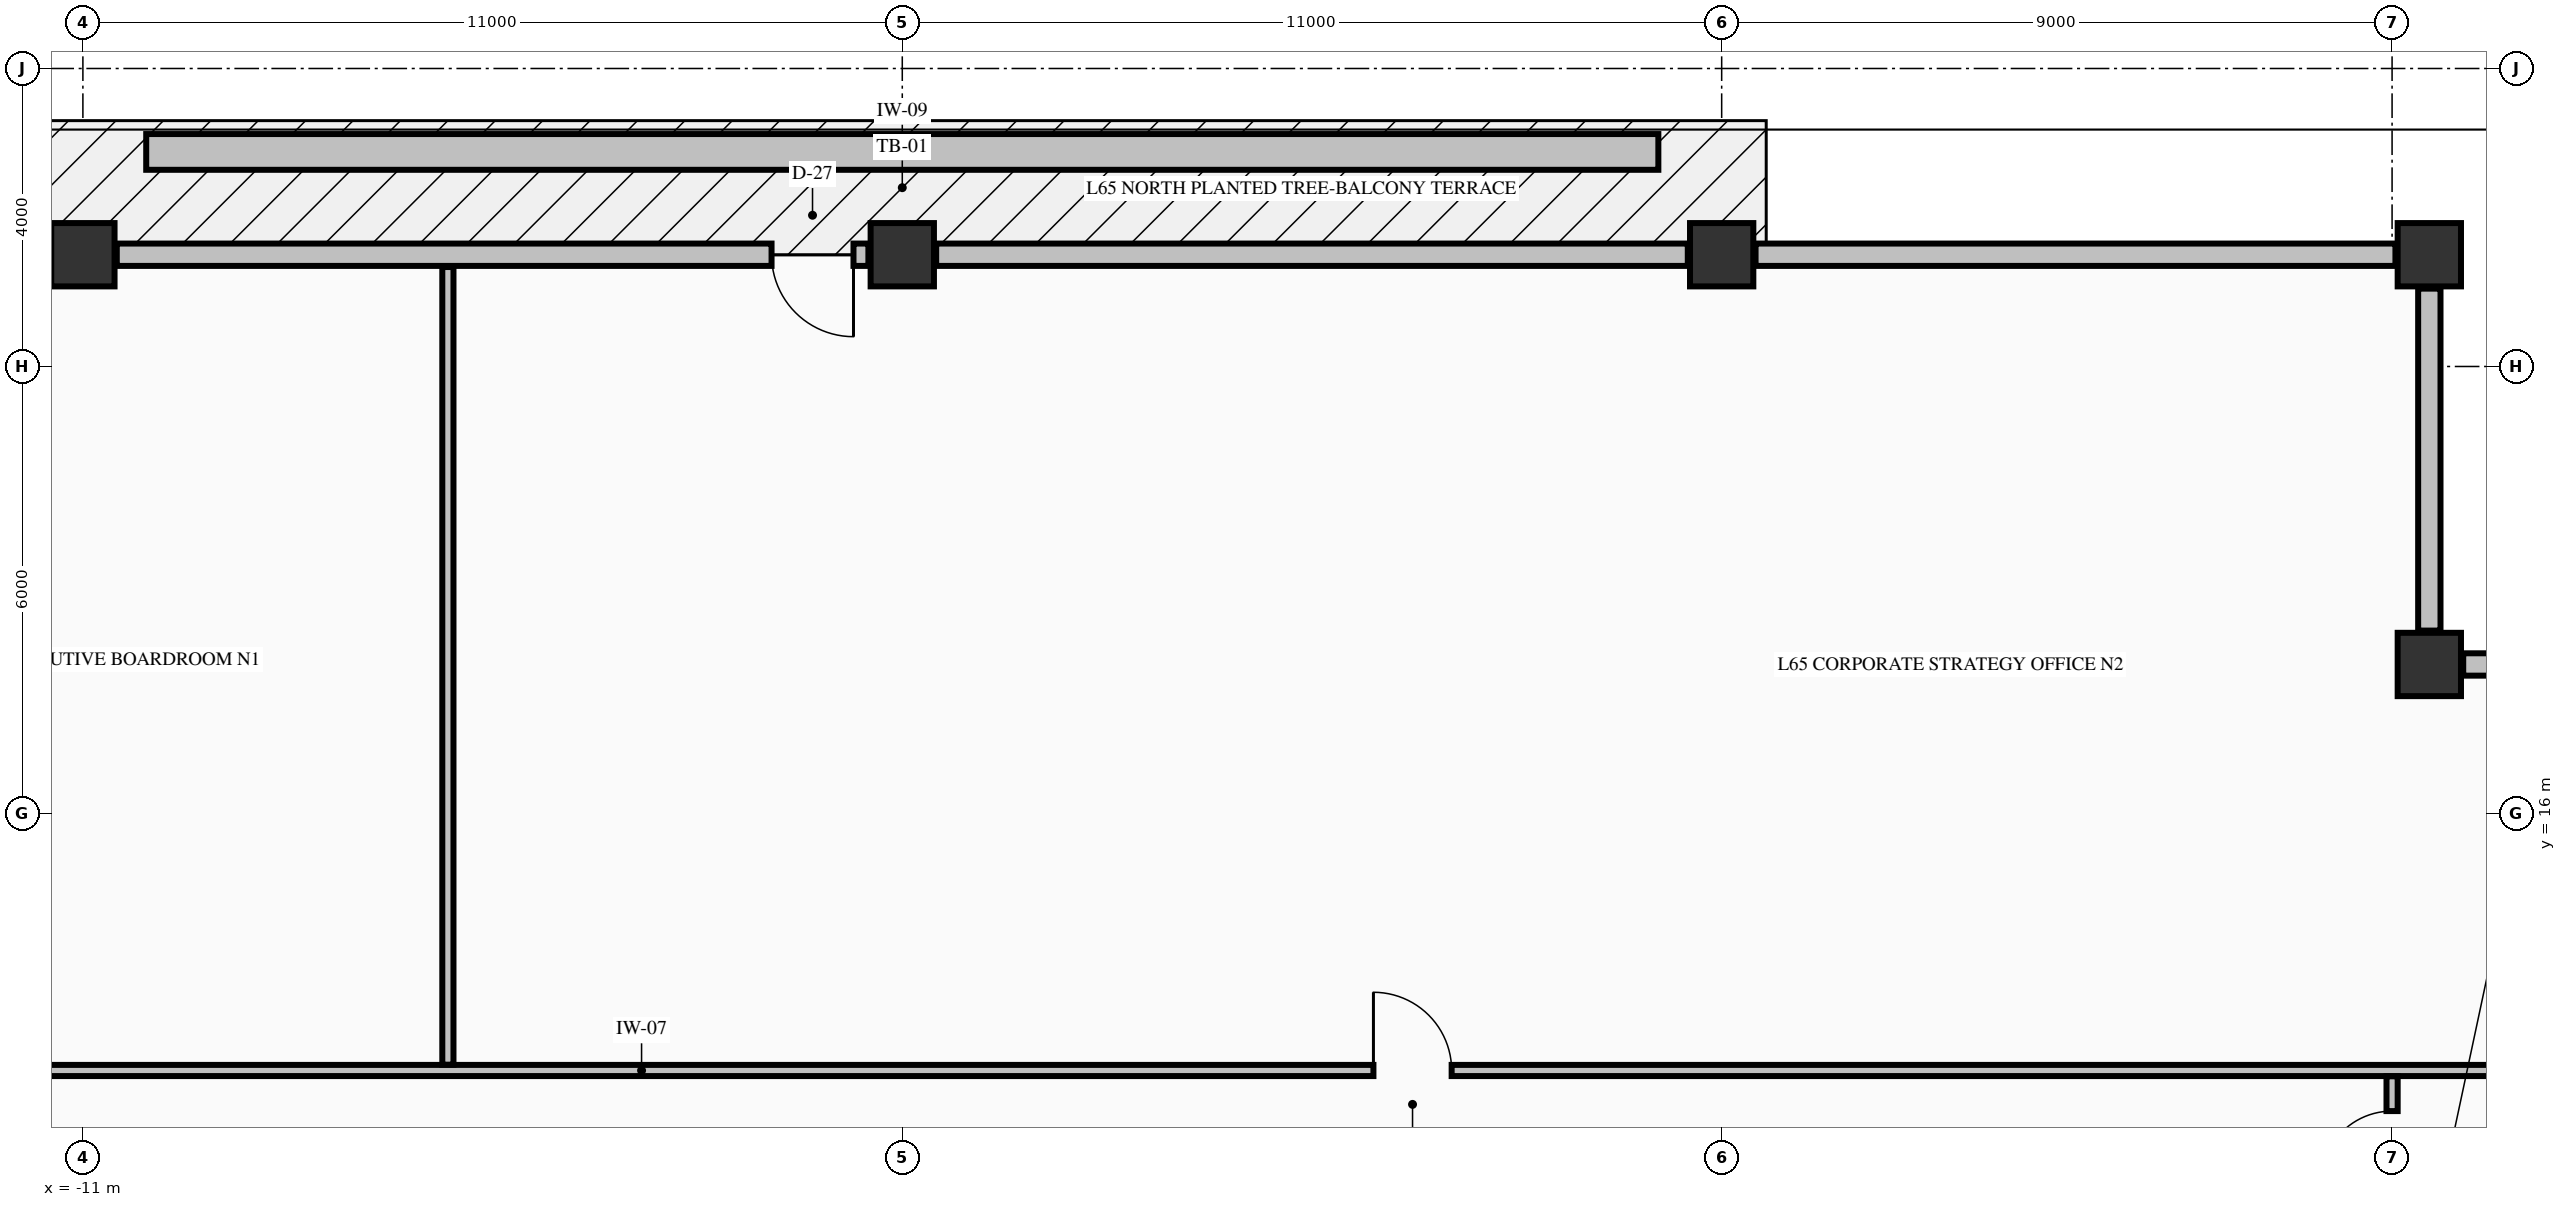
"""IFC4 building model, lengths in metres.
Left out: names, types, materials, properties, quantities, classifications, styles, units other than length and angle.
Written with IfcOpenShell. Run it as: python <this file> out.ifc"""

import sys

from ifc_helpers import new_model, si_unit, direction, frame, frame_2d, origin, origin_2d, place, context, subcontext, project, spatial, rectangle, extrude, element, fill, save


model = new_model("IFC4")
c1 = context("Model", 3, precision=1e-05, world=origin(), true_north=direction((0.0, 1.0)))
c2 = subcontext(c1, "Body", "Model", "MODEL_VIEW")
j1 = project(units=[si_unit("LENGTHUNIT", "METRE"), si_unit("PLANEANGLEUNIT", "RADIAN")], contexts=[c1])
p1 = place(None, origin())
s1 = spatial("IfcSite", under=j1, at=p1, CompositionType="ELEMENT")
p2 = place(p1, origin())
s2 = spatial("IfcBuilding", under=s1, at=p2, CompositionType="ELEMENT")
p3 = place(p2, frame((0.0, 0.0, 246.2)))
s3 = spatial("IfcBuildingStorey", under=s2, at=p3, CompositionType="ELEMENT", Elevation=246.2)
for number, where, z_axis, x_axis in (
    (1, (-11.0, 23.5, -0.25), (0.0, 0.0, 1.0), (1.0, 0.0, 0.0)),
    (2, (0.0, 23.5, -0.25), (0.0, 0.0, 1.0), (1.0, 0.0, 0.0)),
    (3, (11.0, 23.5, -0.25), (0.0, 0.0, 1.0), (1.0, 0.0, 0.0)),
    (4, (20.5, 23.5, -0.25), (0.0, 0.0, 1.0), (1.0, 0.0, 0.0)),
    (5, (20.5, 18.0, -0.25), (0.0, 0.0, 1.0), (1.0, 0.0, 0.0)),
):
    element("IfcColumn", number, at=place(p3, frame(where, z_axis=z_axis, x_axis=x_axis)), inside=s3, PredefinedType="COLUMN", context=c2, shape_type="SweptSolid", body=[
        extrude(rectangle(XDim=0.85, YDim=0.85, at=origin_2d()), origin(), (0.0, 0.0, 1.0), 3.055),
    ])
for number, where, z_axis, x_axis in (
    (6, (25.545, 18.0, 0.0), (0.0, 0.0, 1.0), (-1.0, 0.0, 0.0)),
    (7, (20.5, 18.455, 0.0), (0.0, 0.0, 1.0), (0.0, 1.0, 0.0)),
):
    element("IfcWall", number, at=place(p3, frame(where, z_axis=z_axis, x_axis=x_axis)), inside=s3, PredefinedType="STANDARD", context=c2, shape_type="SweptSolid", body=[
        extrude(rectangle(XDim=4.59, YDim=0.3, at=frame_2d((2.295, 0.0))), origin(), (0.0, 0.0, 1.0), 2.197),
    ])
p4 = place(p3, frame((-0.455, 23.5, 0.0), z_axis=(0.0, 0.0, 1.0), x_axis=(-1.0, 0.0, 0.0)))
e8 = element("IfcWall", 8, at=p4, inside=s3, PredefinedType="STANDARD", context=c2, shape_type="SweptSolid", body=[
    extrude(rectangle(XDim=10.09, YDim=0.3, at=frame_2d((5.045, 0.0))), origin(), (0.0, 0.0, 1.0), 2.197),
])
p5 = place(p4, frame((0.2, 0.0, 0.0)))
e9 = element("IfcOpeningElement", 9, at=p5, cuts=e8, PredefinedType="OPENING", context=c2, shape_type="SweptSolid", body=[
    extrude(rectangle(XDim=1.1, YDim=2.05, at=frame_2d((0.55, 1.025))), frame((0.0, 0.16, 0.0), z_axis=(0.0, -1.0, 0.0), x_axis=(1.0, 0.0, 0.0)), (0.0, 0.0, 1.0), 0.32),
])
p6 = place(p3, frame((10.545, 23.5, 0.0), z_axis=(0.0, 0.0, 1.0), x_axis=(-1.0, 0.0, 0.0)))
e10 = element("IfcWall", 10, at=p6, inside=s3, PredefinedType="STANDARD", context=c2, shape_type="SweptSolid", body=[
    extrude(rectangle(XDim=10.09, YDim=0.3, at=frame_2d((5.045, 0.0))), origin(), (0.0, 0.0, 1.0), 2.197),
])
p7 = place(p3, frame((20.045, 23.5, 0.0), z_axis=(0.0, 0.0, 1.0), x_axis=(-1.0, 0.0, 0.0)))
e11 = element("IfcWall", 11, at=p7, inside=s3, PredefinedType="STANDARD", context=c2, shape_type="SweptSolid", body=[
    extrude(rectangle(XDim=8.59, YDim=0.3, at=frame_2d((4.295, 0.0))), origin(), (0.0, 0.0, 1.0), 2.197),
])
p8 = place(p3, frame((-20.075, 12.55, 0.0), z_axis=(0.0, 0.0, 1.0), x_axis=(1.0, 0.0, 0.0)))
e12 = element("IfcWall", 12, at=p8, inside=s3, PredefinedType="PARTITIONING", context=c2, shape_type="SweptSolid", body=[
    extrude(rectangle(XDim=45.91, YDim=0.15, at=frame_2d((22.955, 0.0))), origin(), (0.0, 0.0, 1.0), 2.805),
])
p9 = place(p8, frame((5.7, 0.0, 0.0)))
e13 = element("IfcOpeningElement", 13, at=p9, cuts=e12, PredefinedType="OPENING", context=c2, shape_type="SweptSolid", body=[
    extrude(rectangle(XDim=1.05, YDim=2.15, at=frame_2d((0.525, 1.075))), frame((0.0, 0.085, 0.0), z_axis=(0.0, -1.0, 0.0), x_axis=(1.0, 0.0, 0.0)), (0.0, 0.0, 1.0), 0.17),
])
p10 = place(p8, frame((26.4, 0.0, 0.0)))
e14 = element("IfcOpeningElement", 14, at=p10, cuts=e12, PredefinedType="OPENING", context=c2, shape_type="SweptSolid", body=[
    extrude(rectangle(XDim=1.05, YDim=2.15, at=frame_2d((0.525, 1.075))), frame((0.0, 0.085, 0.0), z_axis=(0.0, -1.0, 0.0), x_axis=(1.0, 0.0, 0.0)), (0.0, 0.0, 1.0), 0.17),
])
p11 = place(p3, frame((-6.1, 12.628, 0.0), z_axis=(0.0, 0.0, 1.0), x_axis=(0.0, 1.0, 0.0)))
e15 = element("IfcWall", 15, at=p11, inside=s3, PredefinedType="PARTITIONING", context=c2, shape_type="SweptSolid", body=[
    extrude(rectangle(XDim=10.707, YDim=0.15, at=frame_2d((5.354, 0.0))), origin(), (0.0, 0.0, 1.0), 2.805),
])
p12 = place(p3, frame((20.0, 10.856, 0.0), z_axis=(0.0, 0.0, 1.0), x_axis=(0.0, 1.0, 0.0)))
e16 = element("IfcWall", 16, at=p12, inside=s3, PredefinedType="PARTITIONING", context=c2, shape_type="SweptSolid", body=[
    extrude(rectangle(XDim=1.616, YDim=0.15, at=frame_2d((0.808, 0.0))), origin(), (0.0, 0.0, 1.0), 2.805),
])
p13 = place(p12, frame((0.199, 0.0, 0.0)))
e17 = element("IfcOpeningElement", 17, at=p13, cuts=e16, PredefinedType="OPENING", context=c2, shape_type="SweptSolid", body=[
    extrude(rectangle(XDim=0.95, YDim=2.15, at=frame_2d((0.475, 1.075))), frame((0.0, 0.085, 0.0), z_axis=(0.0, -1.0, 0.0), x_axis=(1.0, 0.0, 0.0)), (0.0, 0.0, 1.0), 0.17),
])
p14 = place(p3, frame((-10.15, 24.88, -0.04), z_axis=(0.0, 0.0, 1.0), x_axis=(1.0, 0.0, 0.0)))
e18 = element("IfcWall", 18, at=p14, inside=s3, PredefinedType="PARAPET", context=c2, shape_type="SweptSolid", body=[
    extrude(rectangle(XDim=20.3, YDim=0.48, at=frame_2d((10.15, 0.0))), origin(), (0.0, 0.0, 1.0), 0.52),
])
p15 = place(p5, origin())
e19 = element("IfcDoor", 19, at=p15, inside=s3, OperationType="SINGLE_SWING_LEFT", PredefinedType="DOOR", context=c2, shape_type="SweptSolid", body=[
    extrude(rectangle(XDim=1.1, YDim=2.05, at=frame_2d((0.55, 1.025))), frame((0.0, 0.025, 0.0), z_axis=(0.0, -1.0, 0.0), x_axis=(1.0, 0.0, 0.0)), (0.0, 0.0, 1.0), 0.05),
])
fill(e9, e19)
p16 = place(p10, origin())
e20 = element("IfcDoor", 20, at=p16, inside=s3, OperationType="SINGLE_SWING_LEFT", PredefinedType="DOOR", context=c2, shape_type="SweptSolid", body=[
    extrude(rectangle(XDim=1.05, YDim=2.15, at=frame_2d((0.525, 1.075))), frame((0.0, 0.025, 0.0), z_axis=(0.0, -1.0, 0.0), x_axis=(1.0, 0.0, 0.0)), (0.0, 0.0, 1.0), 0.05),
])
fill(e14, e20)
p17 = place(p13, origin())
e21 = element("IfcDoor", 21, at=p17, inside=s3, OperationType="SINGLE_SWING_LEFT", PredefinedType="DOOR", context=c2, shape_type="SweptSolid", body=[
    extrude(rectangle(XDim=0.95, YDim=2.15, at=frame_2d((0.475, 1.075))), frame((0.0, 0.025, 0.0), z_axis=(0.0, -1.0, 0.0), x_axis=(1.0, 0.0, 0.0)), (0.0, 0.0, 1.0), 0.05),
])
fill(e17, e21)
save(model, sys.argv[1])
